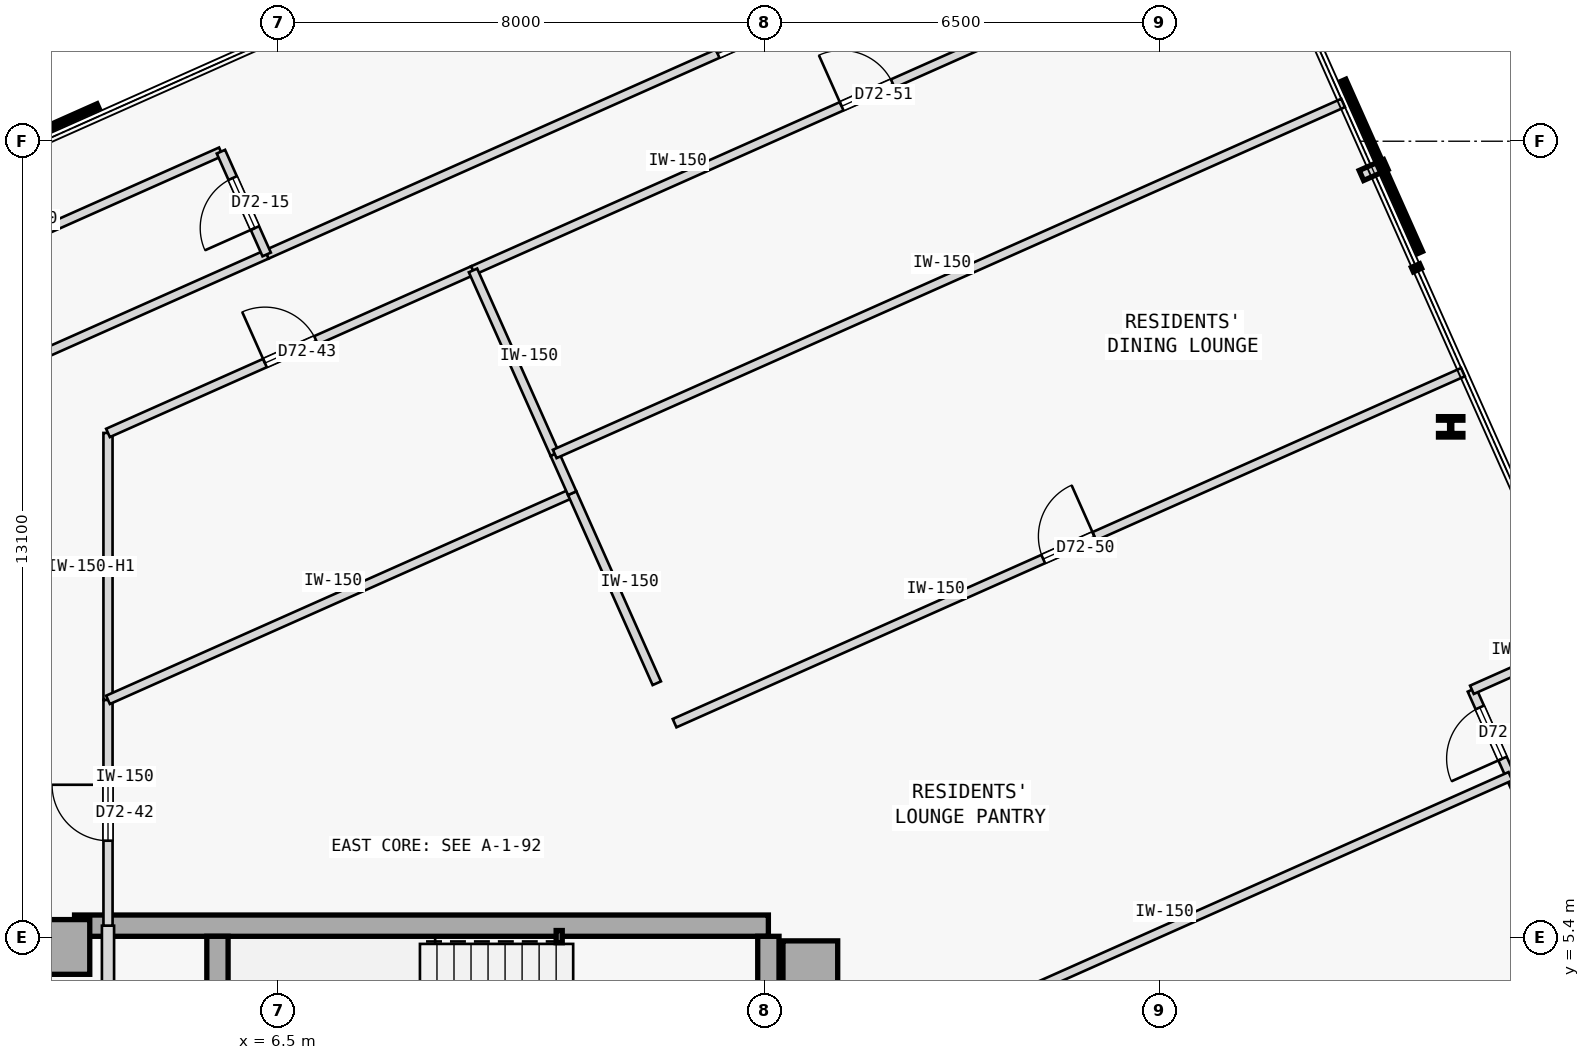
"""IFC4 building model, lengths in metres.
Left out: names, types, materials, properties, quantities, classifications, styles, units other than length and angle.
Written with IfcOpenShell. Run it as: python <this file> out.ifc"""

import sys

from ifc_helpers import new_model, si_unit, direction, frame, frame_2d, origin, origin_2d, place, context, subcontext, project, spatial, rectangle, hollow_rectangle, i_section, extrude, element, fill, save


model = new_model("IFC4")
c1 = context("Model", 3, precision=1e-05, world=origin(), true_north=direction((0.0, 1.0)))
c2 = subcontext(c1, "Body", "Model", "MODEL_VIEW")
j1 = project(units=[si_unit("LENGTHUNIT", "METRE"), si_unit("PLANEANGLEUNIT", "RADIAN")], contexts=[c1])
p1 = place(None, origin())
s1 = spatial("IfcSite", under=j1, at=p1, CompositionType="ELEMENT")
p2 = place(p1, origin())
s2 = spatial("IfcBuilding", under=s1, at=p2, CompositionType="ELEMENT")
p3 = place(p2, frame((0.0, 0.0, 268.9)))
s3 = spatial("IfcBuildingStorey", under=s2, at=p3, CompositionType="ELEMENT", Elevation=268.9)
for number, where, z_axis, x_axis in (
    (1, (15.25, 4.9, 0.0), (0.0, 0.0, 1.0), (1.0, 0.0, 0.0)),
    (2, (2.95, 5.25, 0.0), (0.0, 0.0, 1.0), (1.0, 0.0, 0.0)),
):
    element("IfcColumn", number, at=place(p3, frame(where, z_axis=z_axis, x_axis=x_axis)), inside=s3, PredefinedType="COLUMN", context=c2, shape_type="SweptSolid", body=[
        extrude(rectangle(XDim=0.9, YDim=0.9, at=origin_2d()), origin(), (0.0, 0.0, 1.0), 3.35),
    ])
p4 = place(p3, frame((3.15, 5.6, 0.0), z_axis=(0.0, 0.0, 1.0), x_axis=(1.0, 0.0, 0.0)))
e3 = element("IfcWall", 3, at=p4, inside=s3, PredefinedType="SHEAR", context=c2, shape_type="SweptSolid", body=[
    extrude(rectangle(XDim=11.41, YDim=0.35, at=frame_2d((5.705, 0.0))), origin(), (0.0, 0.0, 1.0), 3.125),
])
p5 = place(p3, frame((14.56, -5.425, 0.0), z_axis=(0.0, 0.0, 1.0), x_axis=(0.0, 1.0, 0.0)))
e4 = element("IfcWall", 4, at=p5, inside=s3, PredefinedType="SHEAR", context=c2, shape_type="SweptSolid", body=[
    extrude(rectangle(XDim=10.85, YDim=0.35, at=frame_2d((5.425, 0.0))), origin(), (0.0, 0.0, 1.0), 3.125),
])
p6 = place(p3, frame((5.5, 2.15, 0.0), z_axis=(0.0, 0.0, 1.0), x_axis=(0.0, 1.0, 0.0)))
e5 = element("IfcWall", 5, at=p6, inside=s3, PredefinedType="SHEAR", context=c2, shape_type="SweptSolid", body=[
    extrude(rectangle(XDim=3.275, YDim=0.35, at=frame_2d((1.638, 0.0))), origin(), (0.0, 0.0, 1.0), 3.125),
])
p7 = place(p3, frame((11.12, 5.42, 0.0), z_axis=(0.0, 0.0, 1.0), x_axis=(1.0, 0.0, 0.0)))
e6 = element("IfcColumn", 6, at=p7, inside=s3, PredefinedType="COLUMN", context=c2, shape_type="SweptSolid", body=[
    extrude(hollow_rectangle(XDim=0.1, YDim=0.2, WallThickness=0.008, at=origin_2d()), origin(), (0.0, 0.0, 1.0), 3.35),
])
p8 = place(p3, frame((25.781, 13.803, 0.0), z_axis=(0.0, 0.0, 1.0), x_axis=(1.0, 0.0, 0.0)))
e7 = element("IfcColumn", 7, at=p8, inside=s3, PredefinedType="COLUMN", context=c2, shape_type="SweptSolid", body=[
    extrude(i_section(OverallWidth=0.401, OverallDepth=0.335, WebThickness=0.036, FlangeThickness=0.058, FilletRadius=0.015, at=origin_2d()), origin(), (0.0, 0.0, 1.0), 3.35),
])
p9 = place(p3, frame((3.7, -1.15, 0.0), z_axis=(0.0, 0.0, 1.0), x_axis=(0.0, 1.0, 0.0)))
e8 = element("IfcWall", 8, at=p9, inside=s3, PredefinedType="STANDARD", context=c2, shape_type="SweptSolid", body=[
    extrude(rectangle(XDim=6.75, YDim=0.2, at=frame_2d((3.375, 0.0))), origin(), (0.0, 0.0, 1.0), 3.125),
])
p10 = place(p9, frame((3.6, 0.0, 0.0)))
e9 = element("IfcOpeningElement", 9, at=p10, cuts=e8, PredefinedType="OPENING", context=c2, shape_type="SweptSolid", body=[
    extrude(rectangle(XDim=0.92, YDim=2.15, at=frame_2d((0.46, 1.075))), frame((0.0, 0.11, 0.0), z_axis=(0.0, -1.0, 0.0), x_axis=(1.0, 0.0, 0.0)), (0.0, 0.0, 1.0), 0.22),
])
p11 = place(p9, frame((0.85, 0.0, 0.0)))
e10 = element("IfcOpeningElement", 10, at=p11, cuts=e8, PredefinedType="OPENING", context=c2, shape_type="SweptSolid", body=[
    extrude(rectangle(XDim=0.9, YDim=2.15, at=frame_2d((0.45, 1.075))), frame((0.0, 0.11, 0.0), z_axis=(0.0, -1.0, 0.0), x_axis=(1.0, 0.0, 0.0)), (0.0, 0.0, 1.0), 0.22),
])
p12 = place(p3, frame((6.31, 16.638, 0.0), z_axis=(0.0, 0.0, 1.0), x_axis=(0.913550659227, 0.406724959925, 0.0)))
e11 = element("IfcWall", 11, at=p12, inside=s3, PredefinedType="PARTITIONING", context=c2, shape_type="SweptSolid", body=[
    extrude(rectangle(XDim=17.185, YDim=0.15, at=frame_2d((8.592, 0.0))), origin(), (0.0, 0.0, 1.0), 3.125),
])
p13 = place(p12, frame((8.117, 0.0, 0.0)))
e12 = element("IfcOpeningElement", 12, at=p13, cuts=e11, PredefinedType="OPENING", context=c2, shape_type="SweptSolid", body=[
    extrude(rectangle(XDim=0.95, YDim=2.15, at=frame_2d((0.475, 1.075))), frame((0.0, 0.085, 0.0), z_axis=(0.0, -1.0, 0.0), x_axis=(1.0, 0.0, 0.0)), (0.0, 0.0, 1.0), 0.17),
])
p14 = place(p3, frame((2.336, 14.869, 0.0), z_axis=(0.0, 0.0, 1.0), x_axis=(0.913545193015, 0.406737237438, 0.0)))
e13 = element("IfcWall", 13, at=p14, inside=s3, PredefinedType="PARTITIONING", context=c2, shape_type="SweptSolid", body=[
    extrude(rectangle(XDim=4.35, YDim=0.15, at=frame_2d((2.175, 0.0))), origin(), (0.0, 0.0, 1.0), 3.125),
])
p15 = place(p3, frame((3.7, 5.601, 0.0), z_axis=(0.0, 0.0, 1.0), x_axis=(0.0, 1.0, 0.0)))
e14 = element("IfcWall", 14, at=p15, inside=s3, PredefinedType="PARTITIONING", context=c2, shape_type="SweptSolid", body=[
    extrude(rectangle(XDim=3.713, YDim=0.15, at=frame_2d((1.856, 0.0))), origin(), (0.0, 0.0, 1.0), 3.125),
])
p16 = place(p15, frame((1.396, 0.0, 0.0)))
e15 = element("IfcOpeningElement", 15, at=p16, cuts=e14, PredefinedType="OPENING", context=c2, shape_type="SweptSolid", body=[
    extrude(rectangle(XDim=0.92, YDim=2.15, at=frame_2d((0.46, 1.075))), frame((0.0, 0.085, 0.0), z_axis=(0.0, -1.0, 0.0), x_axis=(1.0, 0.0, 0.0)), (0.0, 0.0, 1.0), 0.17),
])
p17 = place(p3, frame((3.7, 9.313, 0.0), z_axis=(0.0, 0.0, 1.0), x_axis=(-0.000111240891, 0.999999993813, 0.0)))
e16 = element("IfcWall", 16, at=p17, inside=s3, PredefinedType="PARTITIONING", context=c2, shape_type="SweptSolid", body=[
    extrude(rectangle(XDim=4.389, YDim=0.15, at=frame_2d((2.195, 0.0))), origin(), (0.0, 0.0, 1.0), 2.675),
])
p18 = place(p3, frame((3.7, 13.703, 0.0), z_axis=(0.0, 0.0, 1.0), x_axis=(0.913549363376, 0.406727870542, 0.0)))
e17 = element("IfcWall", 17, at=p18, inside=s3, PredefinedType="PARTITIONING", context=c2, shape_type="SweptSolid", body=[
    extrude(rectangle(XDim=6.571, YDim=0.15, at=frame_2d((3.286, 0.0))), origin(), (0.0, 0.0, 1.0), 3.125),
])
p19 = place(p18, frame((2.825, 0.0, 0.0)))
e18 = element("IfcOpeningElement", 18, at=p19, cuts=e17, PredefinedType="OPENING", context=c2, shape_type="SweptSolid", body=[
    extrude(rectangle(XDim=0.92, YDim=2.15, at=frame_2d((0.46, 1.075))), frame((0.0, 0.085, 0.0), z_axis=(0.0, -1.0, 0.0), x_axis=(1.0, 0.0, 0.0)), (0.0, 0.0, 1.0), 0.17),
])
p20 = place(p3, frame((29.809, 1.216, 0.0), z_axis=(0.0, 0.0, 1.0), x_axis=(-0.406719136744, 0.913553251763, 0.0)))
e19 = element("IfcWall", 19, at=p20, inside=s3, PredefinedType="PARTITIONING", context=c2, shape_type="SweptSolid", body=[
    extrude(rectangle(XDim=7.489, YDim=0.15, at=frame_2d((3.745, 0.0))), origin(), (0.0, 0.0, 1.0), 3.125),
])
p21 = place(p3, frame((26.763, 8.057, 0.0), z_axis=(0.0, 0.0, 1.0), x_axis=(-0.406851688687, 0.913494227356, 0.0)))
e20 = element("IfcWall", 20, at=p21, inside=s3, PredefinedType="PARTITIONING", context=c2, shape_type="SweptSolid", body=[
    extrude(rectangle(XDim=1.556, YDim=0.15, at=frame_2d((0.778, 0.0))), origin(), (0.0, 0.0, 1.0), 3.125),
])
p22 = place(p21, frame((0.318, 0.0, 0.0)))
e21 = element("IfcOpeningElement", 21, at=p22, cuts=e20, PredefinedType="OPENING", context=c2, shape_type="SweptSolid", body=[
    extrude(rectangle(XDim=0.92, YDim=2.15, at=frame_2d((0.46, 1.075))), frame((0.0, 0.085, 0.0), z_axis=(0.0, -1.0, 0.0), x_axis=(1.0, 0.0, 0.0)), (0.0, 0.0, 1.0), 0.17),
])
p23 = place(p3, frame((26.13, 9.479, 0.0), z_axis=(0.0, 0.0, 1.0), x_axis=(0.913573626813, 0.406673368186, 0.0)))
e22 = element("IfcWall", 22, at=p23, inside=s3, PredefinedType="PARTITIONING", context=c2, shape_type="SweptSolid", body=[
    extrude(rectangle(XDim=1.99, YDim=0.15, at=frame_2d((0.995, 0.0))), origin(), (0.0, 0.0, 1.0), 3.125),
])
p24 = place(p3, frame((9.703, 16.375, 0.0), z_axis=(0.0, 0.0, 1.0), x_axis=(0.913544622417, 0.406738519018, 0.0)))
e23 = element("IfcWall", 23, at=p24, inside=s3, PredefinedType="PARTITIONING", context=c2, shape_type="SweptSolid", body=[
    extrude(rectangle(XDim=14.192, YDim=0.15, at=frame_2d((7.096, 0.0))), origin(), (0.0, 0.0, 1.0), 3.125),
])
p25 = place(p24, frame((6.636, 0.0, 0.0)))
e24 = element("IfcOpeningElement", 24, at=p25, cuts=e23, PredefinedType="OPENING", context=c2, shape_type="SweptSolid", body=[
    extrude(rectangle(XDim=0.92, YDim=2.15, at=frame_2d((0.46, 1.075))), frame((0.0, 0.085, 0.0), z_axis=(0.0, -1.0, 0.0), x_axis=(1.0, 0.0, 0.0)), (0.0, 0.0, 1.0), 0.17),
])
p26 = place(p3, frame((1.583, 16.559, 0.0), z_axis=(0.0, 0.0, 1.0), x_axis=(0.913554477336, 0.406716383908, 0.0)))
e25 = element("IfcWall", 25, at=p26, inside=s3, PredefinedType="PARTITIONING", context=c2, shape_type="SweptSolid", body=[
    extrude(rectangle(XDim=4.35, YDim=0.15, at=frame_2d((2.175, 0.0))), origin(), (0.0, 0.0, 1.0), 3.125),
])
p27 = place(p3, frame((6.31, 16.638, 0.0), z_axis=(0.0, 0.0, 1.0), x_axis=(-0.406750635596, 0.913539227643, 0.0)))
e26 = element("IfcWall", 26, at=p27, inside=s3, PredefinedType="PARTITIONING", context=c2, shape_type="SweptSolid", body=[
    extrude(rectangle(XDim=1.85, YDim=0.15, at=frame_2d((0.925, 0.0))), origin(), (0.0, 0.0, 1.0), 3.125),
])
p28 = place(p27, frame((0.475, 0.0, 0.0)))
e27 = element("IfcOpeningElement", 27, at=p28, cuts=e26, PredefinedType="OPENING", context=c2, shape_type="SweptSolid", body=[
    extrude(rectangle(XDim=0.9, YDim=2.15, at=frame_2d((0.45, 1.075))), frame((0.0, 0.085, 0.0), z_axis=(0.0, -1.0, 0.0), x_axis=(1.0, 0.0, 0.0)), (0.0, 0.0, 1.0), 0.17),
])
p29 = place(p3, frame((3.7, 9.313, 0.0), z_axis=(0.0, 0.0, 1.0), x_axis=(0.913545080962, 0.406737489112, 0.0)))
e28 = element("IfcWall", 28, at=p29, inside=s3, PredefinedType="PARTITIONING", context=c2, shape_type="SweptSolid", body=[
    extrude(rectangle(XDim=8.356, YDim=0.15, at=frame_2d((4.178, 0.0))), origin(), (0.0, 0.0, 1.0), 3.125),
])
p30 = place(p3, frame((12.725, 9.587, 0.0), z_axis=(0.0, 0.0, 1.0), x_axis=(-0.406714462948, 0.913555332549, 0.0)))
e29 = element("IfcWall", 29, at=p30, inside=s3, PredefinedType="PARTITIONING", context=c2, shape_type="SweptSolid", body=[
    extrude(rectangle(XDim=3.421, YDim=0.15, at=frame_2d((1.71, 0.0))), origin(), (0.0, 0.0, 1.0), 3.125),
])
p31 = place(p3, frame((11.334, 12.712, 0.0), z_axis=(0.0, 0.0, 1.0), x_axis=(-0.40694029237, 0.913454759934, 0.0)))
e30 = element("IfcWall", 30, at=p31, inside=s3, PredefinedType="PARTITIONING", context=c2, shape_type="SweptSolid", body=[
    extrude(rectangle(XDim=0.706, YDim=0.15, at=frame_2d((0.353, 0.0))), origin(), (0.0, 0.0, 1.0), 3.125),
])
p32 = place(p3, frame((11.046, 13.357, 0.0), z_axis=(0.0, 0.0, 1.0), x_axis=(-0.406714303965, 0.913555403328, 0.0)))
e31 = element("IfcWall", 31, at=p32, inside=s3, PredefinedType="PARTITIONING", context=c2, shape_type="SweptSolid", body=[
    extrude(rectangle(XDim=3.304, YDim=0.15, at=frame_2d((1.652, 0.0))), origin(), (0.0, 0.0, 1.0), 3.125),
])
p33 = place(p3, frame((15.616, 3.094, 0.0), z_axis=(0.0, 0.0, 1.0), x_axis=(0.913550635989, 0.40672501212, 0.0)))
e32 = element("IfcWall", 32, at=p33, inside=s3, PredefinedType="PARTITIONING", context=c2, shape_type="SweptSolid", body=[
    extrude(rectangle(XDim=12.202, YDim=0.15, at=frame_2d((6.101, 0.0))), origin(), (0.0, 0.0, 1.0), 3.125),
])
p34 = place(p3, frame((13.018, 8.93, 0.0), z_axis=(0.0, 0.0, 1.0), x_axis=(0.913551014388, 0.406724162191, 0.0)))
e33 = element("IfcWall", 33, at=p34, inside=s3, PredefinedType="PARTITIONING", context=c2, shape_type="SweptSolid", body=[
    extrude(rectangle(XDim=14.192, YDim=0.15, at=frame_2d((7.096, 0.0))), origin(), (0.0, 0.0, 1.0), 3.125),
])
p35 = place(p34, frame((6.636, 0.0, 0.0)))
e34 = element("IfcOpeningElement", 34, at=p35, cuts=e33, PredefinedType="OPENING", context=c2, shape_type="SweptSolid", body=[
    extrude(rectangle(XDim=0.92, YDim=2.15, at=frame_2d((0.46, 1.075))), frame((0.0, 0.085, 0.0), z_axis=(0.0, -1.0, 0.0), x_axis=(1.0, 0.0, 0.0)), (0.0, 0.0, 1.0), 0.17),
])
p36 = place(p3, frame((11.046, 13.357, 0.0), z_axis=(0.0, 0.0, 1.0), x_axis=(0.913553860075, 0.406717770379, 0.0)))
e35 = element("IfcWall", 35, at=p36, inside=s3, PredefinedType="PARTITIONING", context=c2, shape_type="SweptSolid", body=[
    extrude(rectangle(XDim=14.192, YDim=0.15, at=frame_2d((7.096, 0.0))), origin(), (0.0, 0.0, 1.0), 3.125),
])
p37 = place(p13, origin())
e36 = element("IfcDoor", 36, at=p37, inside=s3, OperationType="SINGLE_SWING_LEFT", PredefinedType="DOOR", context=c2, shape_type="SweptSolid", body=[
    extrude(rectangle(XDim=0.95, YDim=2.15, at=frame_2d((0.475, 1.075))), frame((0.0, 0.025, 0.0), z_axis=(0.0, -1.0, 0.0), x_axis=(1.0, 0.0, 0.0)), (0.0, 0.0, 1.0), 0.05),
])
fill(e12, e36)
p38 = place(p28, origin())
e37 = element("IfcDoor", 37, at=p38, inside=s3, OperationType="SINGLE_SWING_LEFT", PredefinedType="DOOR", context=c2, shape_type="SweptSolid", body=[
    extrude(rectangle(XDim=0.9, YDim=2.15, at=frame_2d((0.45, 1.075))), frame((0.0, 0.025, 0.0), z_axis=(0.0, -1.0, 0.0), x_axis=(1.0, 0.0, 0.0)), (0.0, 0.0, 1.0), 0.05),
])
fill(e27, e37)
p39 = place(p16, origin())
e38 = element("IfcDoor", 38, at=p39, inside=s3, OperationType="SINGLE_SWING_RIGHT", PredefinedType="DOOR", context=c2, shape_type="SweptSolid", body=[
    extrude(rectangle(XDim=0.92, YDim=2.15, at=frame_2d((0.46, 1.075))), frame((0.0, 0.025, 0.0), z_axis=(0.0, -1.0, 0.0), x_axis=(1.0, 0.0, 0.0)), (0.0, 0.0, 1.0), 0.05),
])
fill(e15, e38)
p40 = place(p19, origin())
e39 = element("IfcDoor", 39, at=p40, inside=s3, OperationType="SINGLE_SWING_LEFT", PredefinedType="DOOR", context=c2, shape_type="SweptSolid", body=[
    extrude(rectangle(XDim=0.92, YDim=2.15, at=frame_2d((0.46, 1.075))), frame((0.0, 0.025, 0.0), z_axis=(0.0, -1.0, 0.0), x_axis=(1.0, 0.0, 0.0)), (0.0, 0.0, 1.0), 0.05),
])
fill(e18, e39)
p41 = place(p22, origin())
e40 = element("IfcDoor", 40, at=p41, inside=s3, OperationType="SINGLE_SWING_LEFT", PredefinedType="DOOR", context=c2, shape_type="SweptSolid", body=[
    extrude(rectangle(XDim=0.92, YDim=2.15, at=frame_2d((0.46, 1.075))), frame((0.0, 0.025, 0.0), z_axis=(0.0, -1.0, 0.0), x_axis=(1.0, 0.0, 0.0)), (0.0, 0.0, 1.0), 0.05),
])
fill(e21, e40)
p42 = place(p35, origin())
e41 = element("IfcDoor", 41, at=p42, inside=s3, OperationType="SINGLE_SWING_RIGHT", PredefinedType="DOOR", context=c2, shape_type="SweptSolid", body=[
    extrude(rectangle(XDim=0.92, YDim=2.15, at=frame_2d((0.46, 1.075))), frame((0.0, 0.025, 0.0), z_axis=(0.0, -1.0, 0.0), x_axis=(1.0, 0.0, 0.0)), (0.0, 0.0, 1.0), 0.05),
])
fill(e34, e41)
p43 = place(p25, origin())
e42 = element("IfcDoor", 42, at=p43, inside=s3, OperationType="SINGLE_SWING_LEFT", PredefinedType="DOOR", context=c2, shape_type="SweptSolid", body=[
    extrude(rectangle(XDim=0.92, YDim=2.15, at=frame_2d((0.46, 1.075))), frame((0.0, 0.025, 0.0), z_axis=(0.0, -1.0, 0.0), x_axis=(1.0, 0.0, 0.0)), (0.0, 0.0, 1.0), 0.05),
])
fill(e24, e42)
save(model, sys.argv[1])
